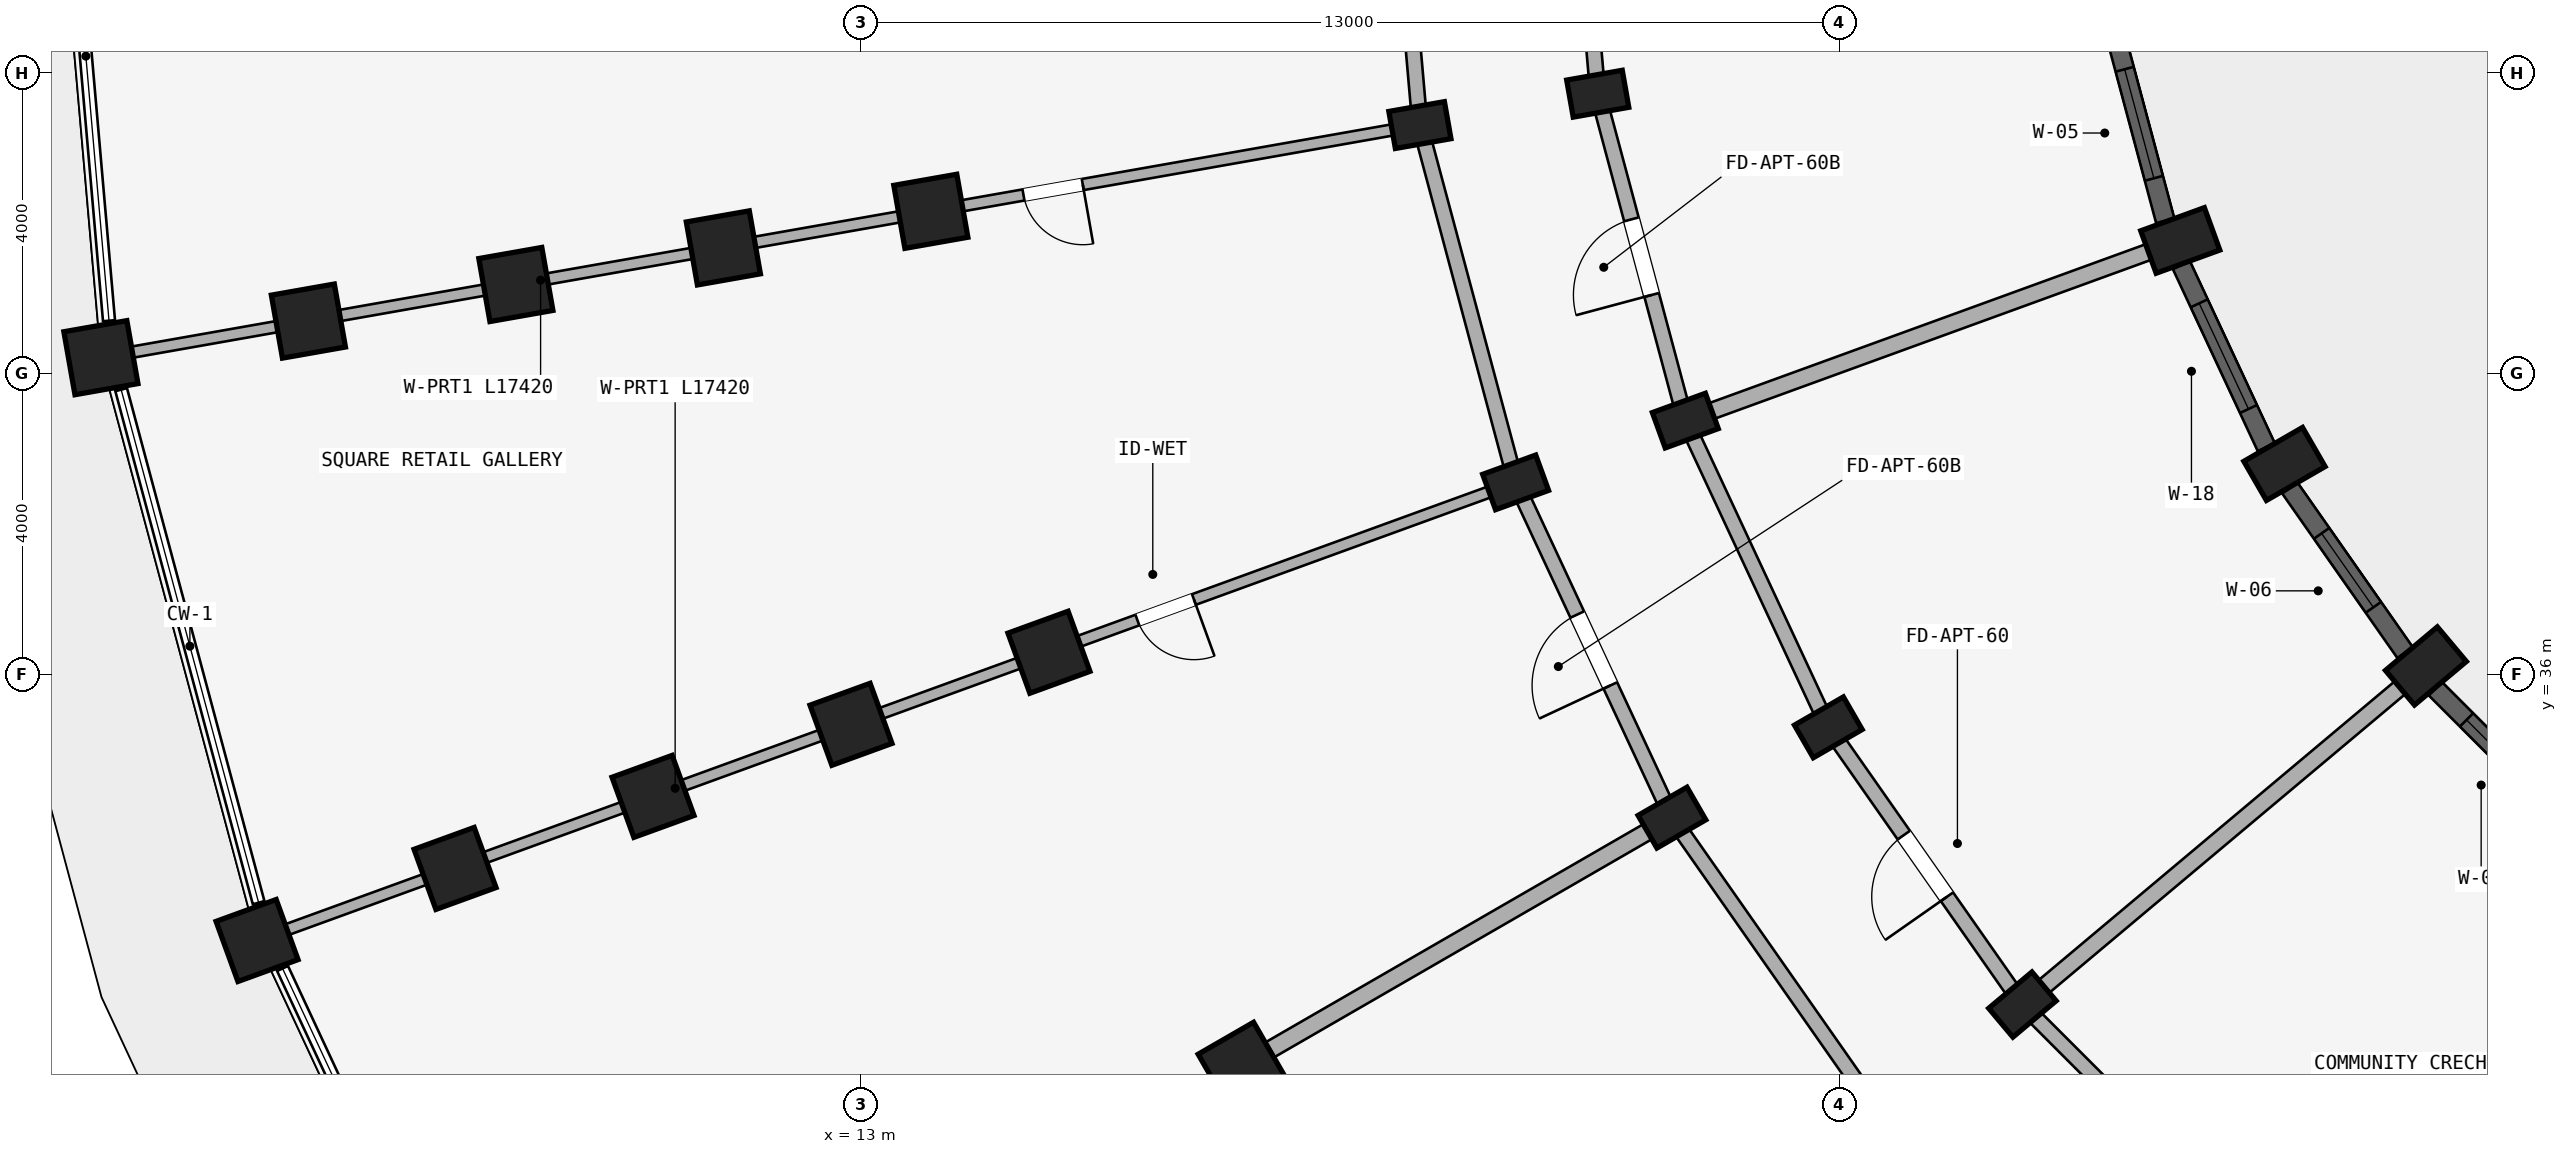
"""IFC4 building model, lengths in metres.
Left out: names, types, materials, properties, quantities, classifications, styles, units other than length and angle.
Written with IfcOpenShell. Run it as: python <this file> out.ifc"""

import sys

from ifc_helpers import new_model, si_unit, direction, frame, frame_2d, origin, origin_2d, place, context, subcontext, project, spatial, rectangle, extrude, element, fill, save


model = new_model("IFC4")
c1 = context("Model", 3, precision=1e-05, world=origin(), true_north=direction((0.0, 1.0)))
c2 = subcontext(c1, "Body", "Model", "MODEL_VIEW")
j1 = project(units=[si_unit("LENGTHUNIT", "METRE"), si_unit("PLANEANGLEUNIT", "RADIAN")], contexts=[c1])
p1 = place(None, origin())
s1 = spatial("IfcSite", under=j1, at=p1, CompositionType="ELEMENT")
p2 = place(p1, origin())
s2 = spatial("IfcBuilding", under=s1, at=p2, CompositionType="ELEMENT")
p3 = place(p2, origin())
s3 = spatial("IfcBuildingStorey", under=s2, at=p3, CompositionType="ELEMENT", Elevation=0.0)
p4 = place(p3, frame((33.798, 36.115, 0.0), z_axis=(0.0, 0.0, 1.0), x_axis=(-0.642787609687, 0.766044443119, 0.0)))
e1 = element("IfcColumn", 1, at=p4, inside=s3, PredefinedType="COLUMN", context=c2, shape_type="SweptSolid", body=[
    extrude(rectangle(XDim=0.6, YDim=0.9, at=origin_2d()), origin(), (0.0, 0.0, 1.0), 4.15),
])
p5 = place(p3, frame((28.436, 31.616, 0.0), z_axis=(0.0, 0.0, 1.0), x_axis=(-0.642787609687, 0.766044443119, 0.0)))
e2 = element("IfcColumn", 2, at=p5, inside=s3, PredefinedType="COLUMN", context=c2, shape_type="SweptSolid", body=[
    extrude(rectangle(XDim=0.5, YDim=0.75, at=origin_2d()), origin(), (0.0, 0.0, 1.0), 4.15),
])
p6 = place(p3, frame((31.919, 38.8, 0.0), z_axis=(0.0, 0.0, 1.0), x_axis=(-0.5, 0.866025403784, 0.0)))
e3 = element("IfcColumn", 3, at=p6, inside=s3, PredefinedType="COLUMN", context=c2, shape_type="SweptSolid", body=[
    extrude(rectangle(XDim=0.6, YDim=0.9, at=origin_2d()), origin(), (0.0, 0.0, 1.0), 4.15),
])
for number, where, z_axis, x_axis in (
    (4, (25.856, 35.3, 0.0), (0.0, 0.0, 1.0), (-0.5, 0.866, 0.0)),
    (5, (23.778, 34.1, 0.0), (0.0, 0.0, 1.0), (-0.5, 0.866, 0.0)),
):
    element("IfcColumn", number, at=place(p3, frame(where, z_axis=z_axis, x_axis=x_axis)), inside=s3, PredefinedType="COLUMN", context=c2, shape_type="SweptSolid", body=[
        extrude(rectangle(XDim=0.5, YDim=0.75, at=origin_2d()), origin(), (0.0, 0.0, 1.0), 4.15),
    ])
p7 = place(p3, frame((18.062, 30.8, 0.0), z_axis=(0.0, 0.0, 1.0), x_axis=(-0.5, 0.866025403784, 0.0)))
e6 = element("IfcColumn", 6, at=p7, inside=s3, PredefinedType="COLUMN", context=c2, shape_type="SweptSolid", body=[
    extrude(rectangle(XDim=0.85, YDim=0.85, at=origin_2d()), origin(), (0.0, 0.0, 1.0), 4.15),
])
p8 = place(p3, frame((30.534, 41.77, 0.0), z_axis=(0.0, 0.0, 1.0), x_axis=(-0.342020143326, 0.939692620786, 0.0)))
e7 = element("IfcColumn", 7, at=p8, inside=s3, PredefinedType="COLUMN", context=c2, shape_type="SweptSolid", body=[
    extrude(rectangle(XDim=0.6, YDim=0.9, at=origin_2d()), origin(), (0.0, 0.0, 1.0), 4.15),
])
for number, where, z_axis, x_axis in (
    (8, (23.956, 39.376, 0.0), (0.0, 0.0, 1.0), (-0.342, 0.94, 0.0)),
    (9, (21.701, 38.555, 0.0), (0.0, 0.0, 1.0), (-0.342, 0.94, 0.0)),
):
    element("IfcColumn", number, at=place(p3, frame(where, z_axis=z_axis, x_axis=x_axis)), inside=s3, PredefinedType="COLUMN", context=c2, shape_type="SweptSolid", body=[
        extrude(rectangle(XDim=0.5, YDim=0.75, at=origin_2d()), origin(), (0.0, 0.0, 1.0), 4.15),
    ])
for number, where, z_axis, x_axis in (
    (10, (15.499, 36.298, 0.0), (0.0, 0.0, 1.0), (-0.342, 0.94, 0.0)),
    (11, (12.868, 35.34, 0.0), (0.0, 0.0, 1.0), (-0.342, 0.94, 0.0)),
    (12, (10.236, 34.382, 0.0), (0.0, 0.0, 1.0), (-0.342, 0.94, 0.0)),
    (13, (7.605, 33.425, 0.0), (0.0, 0.0, 1.0), (-0.342, 0.94, 0.0)),
    (14, (4.974, 32.467, 0.0), (0.0, 0.0, 1.0), (-0.342, 0.94, 0.0)),
):
    element("IfcColumn", number, at=place(p3, frame(where, z_axis=z_axis, x_axis=x_axis)), inside=s3, PredefinedType="COLUMN", context=c2, shape_type="SweptSolid", body=[
        extrude(rectangle(XDim=0.85, YDim=0.85, at=origin_2d()), origin(), (0.0, 0.0, 1.0), 4.15),
    ])
for number, where, z_axis, x_axis in (
    (15, (22.792, 43.72, 0.0), (0.0, 0.0, 1.0), (-0.174, 0.985, 0.0)),
    (16, (20.428, 43.303, 0.0), (0.0, 0.0, 1.0), (-0.174, 0.985, 0.0)),
):
    element("IfcColumn", number, at=place(p3, frame(where, z_axis=z_axis, x_axis=x_axis)), inside=s3, PredefinedType="COLUMN", context=c2, shape_type="SweptSolid", body=[
        extrude(rectangle(XDim=0.5, YDim=0.75, at=origin_2d()), origin(), (0.0, 0.0, 1.0), 4.15),
    ])
for number, where, z_axis, x_axis in (
    (17, (13.929, 42.157, 0.0), (0.0, 0.0, 1.0), (-0.174, 0.985, 0.0)),
    (18, (11.171, 41.671, 0.0), (0.0, 0.0, 1.0), (-0.174, 0.985, 0.0)),
    (19, (8.414, 41.185, 0.0), (0.0, 0.0, 1.0), (-0.174, 0.985, 0.0)),
    (20, (5.656, 40.698, 0.0), (0.0, 0.0, 1.0), (-0.174, 0.985, 0.0)),
    (21, (2.899, 40.212, 0.0), (0.0, 0.0, 1.0), (-0.174, 0.985, 0.0)),
):
    element("IfcColumn", number, at=place(p3, frame(where, z_axis=z_axis, x_axis=x_axis)), inside=s3, PredefinedType="COLUMN", context=c2, shape_type="SweptSolid", body=[
        extrude(rectangle(XDim=0.85, YDim=0.85, at=origin_2d()), origin(), (0.0, 0.0, 1.0), 4.15),
    ])
p9 = place(p3, frame((31.616, 28.436, 0.0), z_axis=(0.0, 0.0, 1.0), x_axis=(-0.707106781187, 0.707106781187, 0.0)))
e22 = element("IfcWall", 22, at=p9, inside=s3, PredefinedType="STANDARD", context=c2, shape_type="SweptSolid", body=[
    extrude(rectangle(XDim=4.497, YDim=0.2, at=frame_2d((2.249, 0.0))), origin(), (0.0, 0.0, 1.0), 3.492),
])
p10 = place(p3, frame((28.436, 31.616, 0.0), z_axis=(0.0, 0.0, 1.0), x_axis=(-0.573571637217, 0.819155404658, 0.0)))
e23 = element("IfcWall", 23, at=p10, inside=s3, PredefinedType="STANDARD", context=c2, shape_type="SweptSolid", body=[
    extrude(rectangle(XDim=4.497, YDim=0.2, at=frame_2d((2.249, 0.0))), origin(), (0.0, 0.0, 1.0), 3.492),
])
p11 = place(p10, frame((1.749, 0.0, 0.0)))
e24 = element("IfcOpeningElement", 24, at=p11, cuts=e23, PredefinedType="OPENING", context=c2, shape_type="SweptSolid", body=[
    extrude(rectangle(XDim=1.0, YDim=2.15, at=frame_2d((0.5, 1.075))), frame((0.0, 0.11, 0.0), z_axis=(0.0, -1.0, 0.0), x_axis=(1.0, 0.0, 0.0)), (0.0, 0.0, 1.0), 0.22),
])
p12 = place(p3, frame((26.598, 30.073, 0.0), z_axis=(0.0, 0.0, 1.0), x_axis=(-0.573592335331, 0.819140911474, 0.0)))
e25 = element("IfcWall", 25, at=p12, inside=s3, PredefinedType="STANDARD", context=c2, shape_type="SweptSolid", body=[
    extrude(rectangle(XDim=4.916, YDim=0.2, at=frame_2d((2.458, 0.0))), origin(), (0.0, 0.0, 1.0), 3.492),
])
p13 = place(p3, frame((25.856, 35.3, 0.0), z_axis=(0.0, 0.0, 1.0), x_axis=(-0.422617978463, 0.906307919131, 0.0)))
e26 = element("IfcWall", 26, at=p13, inside=s3, PredefinedType="STANDARD", context=c2, shape_type="SweptSolid", body=[
    extrude(rectangle(XDim=4.497, YDim=0.2, at=frame_2d((2.249, 0.0))), origin(), (0.0, 0.0, 1.0), 3.492),
])
p14 = place(p3, frame((23.778, 34.1, 0.0), z_axis=(0.0, 0.0, 1.0), x_axis=(-0.422629854778, 0.906302381024, 0.0)))
e27 = element("IfcWall", 27, at=p14, inside=s3, PredefinedType="STANDARD", context=c2, shape_type="SweptSolid", body=[
    extrude(rectangle(XDim=4.915, YDim=0.2, at=frame_2d((2.458, 0.0))), origin(), (0.0, 0.0, 1.0), 3.492),
])
p15 = place(p14, frame((1.938, 0.0, 0.0)))
e28 = element("IfcOpeningElement", 28, at=p15, cuts=e27, PredefinedType="OPENING", context=c2, shape_type="SweptSolid", body=[
    extrude(rectangle(XDim=1.04, YDim=2.15, at=frame_2d((0.52, 1.075))), frame((0.0, 0.11, 0.0), z_axis=(0.0, -1.0, 0.0), x_axis=(1.0, 0.0, 0.0)), (0.0, 0.0, 1.0), 0.22),
])
p16 = place(p3, frame((23.956, 39.376, 0.0), z_axis=(0.0, 0.0, 1.0), x_axis=(-0.258787642463, 0.965934240054, 0.0)))
e29 = element("IfcWall", 29, at=p16, inside=s3, PredefinedType="STANDARD", context=c2, shape_type="SweptSolid", body=[
    extrude(rectangle(XDim=4.497, YDim=0.2, at=frame_2d((2.249, 0.0))), origin(), (0.0, 0.0, 1.0), 3.492),
])
p17 = place(p16, frame((1.729, 0.0, 0.0)))
e30 = element("IfcOpeningElement", 30, at=p17, cuts=e29, PredefinedType="OPENING", context=c2, shape_type="SweptSolid", body=[
    extrude(rectangle(XDim=1.04, YDim=2.15, at=frame_2d((0.52, 1.075))), frame((0.0, 0.11, 0.0), z_axis=(0.0, -1.0, 0.0), x_axis=(1.0, 0.0, 0.0)), (0.0, 0.0, 1.0), 0.22),
])
p18 = place(p3, frame((21.701, 38.555, 0.0), z_axis=(0.0, 0.0, 1.0), x_axis=(-0.258803112091, 0.965930095386, 0.0)))
e31 = element("IfcWall", 31, at=p18, inside=s3, PredefinedType="STANDARD", context=c2, shape_type="SweptSolid", body=[
    extrude(rectangle(XDim=4.916, YDim=0.2, at=frame_2d((2.458, 0.0))), origin(), (0.0, 0.0, 1.0), 3.492),
])
p19 = place(p3, frame((22.792, 43.72, 0.0), z_axis=(0.0, 0.0, 1.0), x_axis=(-0.087187153726, 0.996191949488, 0.0)))
e32 = element("IfcWall", 32, at=p19, inside=s3, PredefinedType="STANDARD", context=c2, shape_type="SweptSolid", body=[
    extrude(rectangle(XDim=4.497, YDim=0.2, at=frame_2d((2.249, 0.0))), origin(), (0.0, 0.0, 1.0), 3.492),
])
p20 = place(p3, frame((20.428, 43.303, 0.0), z_axis=(0.0, 0.0, 1.0), x_axis=(-0.087167566415, 0.996193663584, 0.0)))
e33 = element("IfcWall", 33, at=p20, inside=s3, PredefinedType="STANDARD", context=c2, shape_type="SweptSolid", body=[
    extrude(rectangle(XDim=4.916, YDim=0.2, at=frame_2d((2.458, 0.0))), origin(), (0.0, 0.0, 1.0), 3.492),
])
p21 = place(p3, frame((33.645, 35.987, 0.0), z_axis=(0.0, 0.0, 1.0), x_axis=(-0.766046761698, -0.642784846501, 0.0)))
e34 = element("IfcWall", 34, at=p21, inside=s3, PredefinedType="STANDARD", context=c2, shape_type="SweptSolid", body=[
    extrude(rectangle(XDim=6.75, YDim=0.22, at=frame_2d((3.375, 0.0))), origin(), (0.0, 0.0, 1.0), 3.492),
])
p22 = place(p3, frame((23.691, 34.05, 0.0), z_axis=(0.0, 0.0, 1.0), x_axis=(-0.866026648973, -0.499997843263, 0.0)))
e35 = element("IfcWall", 35, at=p22, inside=s3, PredefinedType="STANDARD", context=c2, shape_type="SweptSolid", body=[
    extrude(rectangle(XDim=17.42, YDim=0.23, at=frame_2d((8.71, 0.0))), origin(), (0.0, 0.0, 1.0), 3.492),
])
p23 = place(p3, frame((30.346, 41.702, 0.0), z_axis=(0.0, 0.0, 1.0), x_axis=(-0.939696231917, -0.342010221662, 0.0)))
e36 = element("IfcWall", 36, at=p23, inside=s3, PredefinedType="STANDARD", context=c2, shape_type="SweptSolid", body=[
    extrude(rectangle(XDim=6.75, YDim=0.22, at=frame_2d((3.375, 0.0))), origin(), (0.0, 0.0, 1.0), 3.492),
])
p24 = place(p3, frame((21.607, 38.521, 0.0), z_axis=(0.0, 0.0, 1.0), x_axis=(-0.939691901159, -0.342022120477, 0.0)))
e37 = element("IfcWall", 37, at=p24, inside=s3, PredefinedType="PARTITIONING", context=c2, shape_type="SweptSolid", body=[
    extrude(rectangle(XDim=17.42, YDim=0.15, at=frame_2d((8.71, 0.0))), origin(), (0.0, 0.0, 1.0), 3.492),
])
p25 = place(p24, frame((4.45, 0.0, 0.0)))
e38 = element("IfcOpeningElement", 38, at=p25, cuts=e37, PredefinedType="OPENING", context=c2, shape_type="SweptSolid", body=[
    extrude(rectangle(XDim=0.8, YDim=2.1, at=frame_2d((0.4, 1.05))), frame((0.0, 0.085, 0.0), z_axis=(0.0, -1.0, 0.0), x_axis=(1.0, 0.0, 0.0)), (0.0, 0.0, 1.0), 0.17),
])
p26 = place(p3, frame((20.33, 43.286, 0.0), z_axis=(0.0, 0.0, 1.0), x_axis=(-0.984808098809, -0.173646216546, 0.0)))
e39 = element("IfcWall", 39, at=p26, inside=s3, PredefinedType="PARTITIONING", context=c2, shape_type="SweptSolid", body=[
    extrude(rectangle(XDim=17.42, YDim=0.15, at=frame_2d((8.71, 0.0))), origin(), (0.0, 0.0, 1.0), 3.492),
])
p27 = place(p26, frame((4.45, 0.0, 0.0)))
e40 = element("IfcOpeningElement", 40, at=p27, cuts=e39, PredefinedType="OPENING", context=c2, shape_type="SweptSolid", body=[
    extrude(rectangle(XDim=0.8, YDim=2.1, at=frame_2d((0.4, 1.05))), frame((0.0, 0.085, 0.0), z_axis=(0.0, -1.0, 0.0), x_axis=(1.0, 0.0, 0.0)), (0.0, 0.0, 1.0), 0.17),
])
p28 = place(p3, frame((35.812, 33.925, 0.0), z_axis=(0.0, 0.0, 1.0), x_axis=(-0.707106781187, 0.707106781187, 0.0)))
e41 = element("IfcWall", 41, at=p28, inside=s3, PredefinedType="STANDARD", context=c2, shape_type="SweptSolid", body=[
    extrude(rectangle(XDim=2.67, YDim=0.25, at=frame_2d((1.335, 0.0))), origin(), (0.0, 0.0, 1.0), 3.692),
])
p29 = place(p28, frame((0.585, 0.0, 0.88)))
e42 = element("IfcOpeningElement", 42, at=p29, cuts=e41, PredefinedType="OPENING", context=c2, shape_type="SweptSolid", body=[
    extrude(rectangle(XDim=1.5, YDim=1.65, at=frame_2d((0.75, 0.825))), frame((0.0, 0.135, 0.0), z_axis=(0.0, -1.0, 0.0), x_axis=(1.0, 0.0, 0.0)), (0.0, 0.0, 1.0), 0.27),
])
p30 = place(p3, frame((33.522, 36.293, 0.0), z_axis=(0.0, 0.0, 1.0), x_axis=(-0.573591230309, 0.819141685249, 0.0)))
e43 = element("IfcWall", 43, at=p30, inside=s3, PredefinedType="STANDARD", context=c2, shape_type="SweptSolid", body=[
    extrude(rectangle(XDim=2.67, YDim=0.25, at=frame_2d((1.335, 0.0))), origin(), (0.0, 0.0, 1.0), 3.692),
])
p31 = place(p30, frame((0.735, 0.0, 0.88)))
e44 = element("IfcOpeningElement", 44, at=p31, cuts=e43, PredefinedType="OPENING", context=c2, shape_type="SweptSolid", body=[
    extrude(rectangle(XDim=1.2, YDim=1.5, at=frame_2d((0.6, 0.75))), frame((0.0, 0.135, 0.0), z_axis=(0.0, -1.0, 0.0), x_axis=(1.0, 0.0, 0.0)), (0.0, 0.0, 1.0), 0.27),
])
p32 = place(p3, frame((31.677, 39.022, 0.0), z_axis=(0.0, 0.0, 1.0), x_axis=(-0.422610081738, 0.90631160139, 0.0)))
e45 = element("IfcWall", 45, at=p32, inside=s3, PredefinedType="STANDARD", context=c2, shape_type="SweptSolid", body=[
    extrude(rectangle(XDim=2.669, YDim=0.25, at=frame_2d((1.335, 0.0))), origin(), (0.0, 0.0, 1.0), 3.692),
])
p33 = place(p32, frame((0.56, 0.0, 0.88)))
e46 = element("IfcOpeningElement", 46, at=p33, cuts=e45, PredefinedType="OPENING", context=c2, shape_type="SweptSolid", body=[
    extrude(rectangle(XDim=1.55, YDim=1.6, at=frame_2d((0.775, 0.8))), frame((0.0, 0.135, 0.0), z_axis=(0.0, -1.0, 0.0), x_axis=(1.0, 0.0, 0.0)), (0.0, 0.0, 1.0), 0.27),
])
p34 = place(p3, frame((30.334, 42.031, 0.0), z_axis=(0.0, 0.0, 1.0), x_axis=(-0.258812272661, 0.965927640934, 0.0)))
e47 = element("IfcWall", 47, at=p34, inside=s3, PredefinedType="STANDARD", context=c2, shape_type="SweptSolid", body=[
    extrude(rectangle(XDim=2.67, YDim=0.25, at=frame_2d((1.335, 0.0))), origin(), (0.0, 0.0, 1.0), 3.692),
])
p35 = place(p34, frame((0.585, 0.0, 0.88)))
e48 = element("IfcOpeningElement", 48, at=p35, cuts=e47, PredefinedType="OPENING", context=c2, shape_type="SweptSolid", body=[
    extrude(rectangle(XDim=1.5, YDim=1.65, at=frame_2d((0.75, 0.825))), frame((0.0, 0.135, 0.0), z_axis=(0.0, -1.0, 0.0), x_axis=(1.0, 0.0, 0.0)), (0.0, 0.0, 1.0), 0.27),
])
p36 = place(p29, origin())
e49 = element("IfcWindow", 49, at=p36, inside=s3, PartitioningType="DOUBLE_PANEL_VERTICAL", PredefinedType="WINDOW", context=c2, shape_type="SweptSolid", body=[
    extrude(rectangle(XDim=1.5, YDim=1.65, at=frame_2d((0.75, 0.825))), frame((0.0, 0.03, 0.0), z_axis=(0.0, -1.0, 0.0), x_axis=(1.0, 0.0, 0.0)), (0.0, 0.0, 1.0), 0.06),
])
fill(e42, e49)
p37 = place(p31, origin())
e50 = element("IfcWindow", 50, at=p37, inside=s3, PartitioningType="SINGLE_PANEL", PredefinedType="WINDOW", context=c2, shape_type="SweptSolid", body=[
    extrude(rectangle(XDim=1.2, YDim=1.5, at=frame_2d((0.6, 0.75))), frame((0.0, 0.03, 0.0), z_axis=(0.0, -1.0, 0.0), x_axis=(1.0, 0.0, 0.0)), (0.0, 0.0, 1.0), 0.06),
])
fill(e44, e50)
p38 = place(p33, origin())
e51 = element("IfcWindow", 51, at=p38, inside=s3, PartitioningType="DOUBLE_PANEL_VERTICAL", PredefinedType="WINDOW", context=c2, shape_type="SweptSolid", body=[
    extrude(rectangle(XDim=1.55, YDim=1.6, at=frame_2d((0.775, 0.8))), frame((0.0, 0.03, 0.0), z_axis=(0.0, -1.0, 0.0), x_axis=(1.0, 0.0, 0.0)), (0.0, 0.0, 1.0), 0.06),
])
fill(e46, e51)
p39 = place(p35, origin())
e52 = element("IfcWindow", 52, at=p39, inside=s3, PartitioningType="DOUBLE_PANEL_VERTICAL", PredefinedType="WINDOW", context=c2, shape_type="SweptSolid", body=[
    extrude(rectangle(XDim=1.5, YDim=1.65, at=frame_2d((0.75, 0.825))), frame((0.0, 0.03, 0.0), z_axis=(0.0, -1.0, 0.0), x_axis=(1.0, 0.0, 0.0)), (0.0, 0.0, 1.0), 0.06),
])
fill(e48, e52)
p40 = place(p25, origin())
e53 = element("IfcDoor", 53, at=p40, inside=s3, OperationType="SINGLE_SWING_LEFT", PredefinedType="DOOR", context=c2, shape_type="SweptSolid", body=[
    extrude(rectangle(XDim=0.8, YDim=2.1, at=frame_2d((0.4, 1.05))), frame((0.0, 0.025, 0.0), z_axis=(0.0, -1.0, 0.0), x_axis=(1.0, 0.0, 0.0)), (0.0, 0.0, 1.0), 0.05),
])
fill(e38, e53)
p41 = place(p27, frame((0.8, 0.0, 0.0), z_axis=(0.0, 0.0, 1.0), x_axis=(-1.0, 0.0, 0.0)))
e54 = element("IfcDoor", 54, at=p41, inside=s3, OperationType="SINGLE_SWING_RIGHT", PredefinedType="DOOR", context=c2, shape_type="SweptSolid", body=[
    extrude(rectangle(XDim=0.8, YDim=2.1, at=frame_2d((0.4, 1.05))), frame((0.0, 0.025, 0.0), z_axis=(0.0, -1.0, 0.0), x_axis=(1.0, 0.0, 0.0)), (0.0, 0.0, 1.0), 0.05),
])
fill(e40, e54)
p42 = place(p15, frame((1.04, 0.0, 0.0), z_axis=(0.0, 0.0, 1.0), x_axis=(-1.0, 0.0, 0.0)))
e55 = element("IfcDoor", 55, at=p42, inside=s3, OperationType="SINGLE_SWING_RIGHT", PredefinedType="DOOR", context=c2, shape_type="SweptSolid", body=[
    extrude(rectangle(XDim=1.04, YDim=2.15, at=frame_2d((0.52, 1.075))), frame((0.0, 0.025, 0.0), z_axis=(0.0, -1.0, 0.0), x_axis=(1.0, 0.0, 0.0)), (0.0, 0.0, 1.0), 0.05),
])
fill(e28, e55)
p43 = place(p11, origin())
e56 = element("IfcDoor", 56, at=p43, inside=s3, OperationType="SINGLE_SWING_LEFT", PredefinedType="DOOR", context=c2, shape_type="SweptSolid", body=[
    extrude(rectangle(XDim=1.0, YDim=2.15, at=frame_2d((0.5, 1.075))), frame((0.0, 0.025, 0.0), z_axis=(0.0, -1.0, 0.0), x_axis=(1.0, 0.0, 0.0)), (0.0, 0.0, 1.0), 0.05),
])
fill(e24, e56)
p44 = place(p17, frame((1.04, 0.0, 0.0), z_axis=(0.0, 0.0, 1.0), x_axis=(-1.0, 0.0, 0.0)))
e57 = element("IfcDoor", 57, at=p44, inside=s3, OperationType="SINGLE_SWING_RIGHT", PredefinedType="DOOR", context=c2, shape_type="SweptSolid", body=[
    extrude(rectangle(XDim=1.04, YDim=2.15, at=frame_2d((0.52, 1.075))), frame((0.0, 0.025, 0.0), z_axis=(0.0, -1.0, 0.0), x_axis=(1.0, 0.0, 0.0)), (0.0, 0.0, 1.0), 0.05),
])
fill(e30, e57)
save(model, sys.argv[1])
